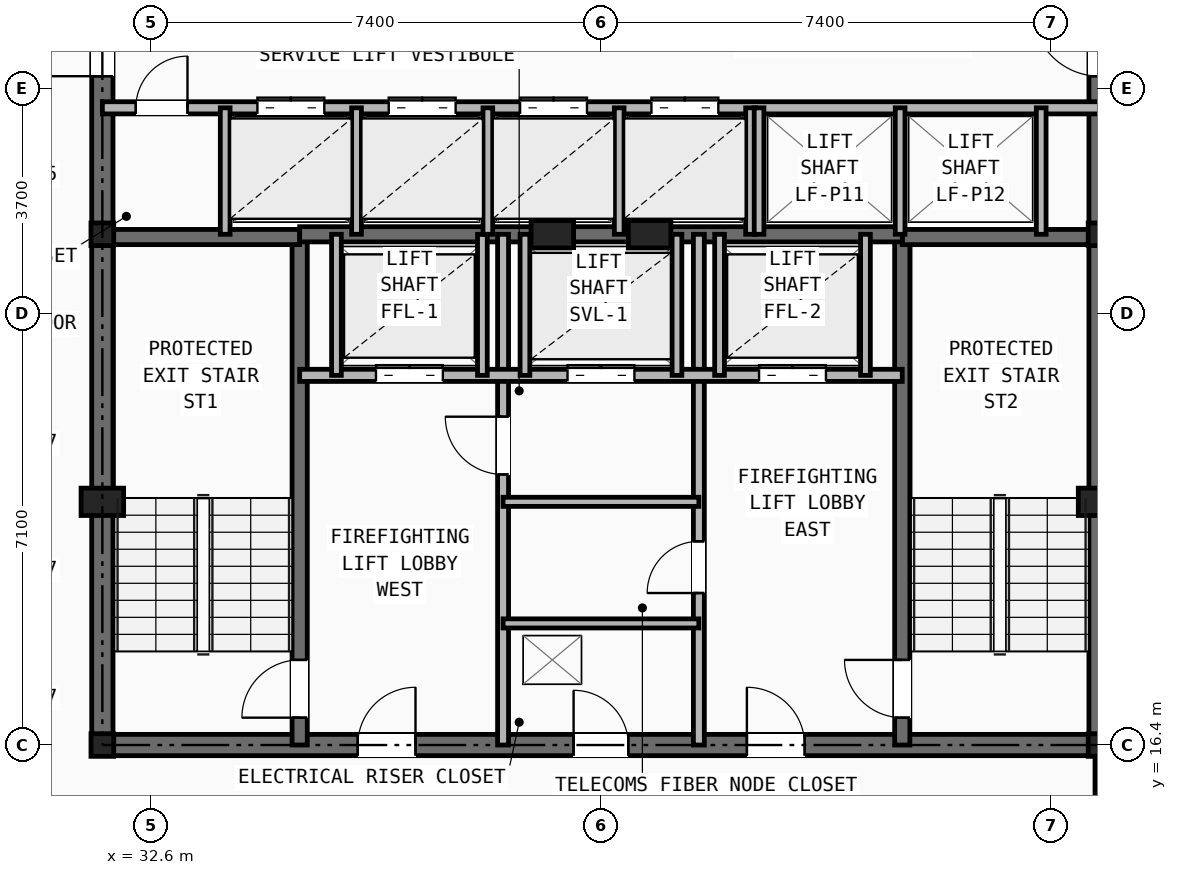
"""IFC4 building model, lengths in metres.
Left out: names, types, materials, properties, quantities, classifications, styles, units other than length and angle.
Written with IfcOpenShell. Run it as: python <this file> out.ifc"""

import sys

from ifc_helpers import new_model, si_unit, direction, frame, frame_2d, origin, origin_2d, place, context, subcontext, project, spatial, rectangle, i_section, extrude, element, fill, save


model = new_model("IFC4")
c1 = context("Model", 3, precision=1e-05, world=origin(), true_north=direction((0.0, 1.0)))
c2 = subcontext(c1, "Body", "Model", "MODEL_VIEW")
j1 = project(units=[si_unit("LENGTHUNIT", "METRE"), si_unit("PLANEANGLEUNIT", "RADIAN")], contexts=[c1])
p1 = place(None, origin())
s1 = spatial("IfcSite", under=j1, at=p1, CompositionType="ELEMENT")
p2 = place(p1, origin())
s2 = spatial("IfcBuilding", under=s1, at=p2, CompositionType="ELEMENT")
p3 = place(p2, frame((0.0, 0.0, 116.0)))
s3 = spatial("IfcBuildingStorey", under=s2, at=p3, CompositionType="ELEMENT", Elevation=116.0)
for number, where, z_axis, x_axis in (
    (1, (31.8, 16.4, 0.0), (0.0, 0.0, 1.0), (1.0, 0.0, 0.0)),
    (2, (48.2, 16.4, 0.0), (0.0, 0.0, 1.0), (1.0, 0.0, 0.0)),
    (3, (31.8, 24.8, 0.0), (0.0, 0.0, 1.0), (1.0, 0.0, 0.0)),
    (4, (48.2, 24.8, 0.0), (0.0, 0.0, 1.0), (1.0, 0.0, 0.0)),
):
    element("IfcColumn", number, at=place(p3, frame(where, z_axis=z_axis, x_axis=x_axis)), inside=s3, PredefinedType="COLUMN", context=c2, shape_type="SweptSolid", body=[
        extrude(i_section(OverallWidth=0.374, OverallDepth=0.372, WebThickness=0.016, FlangeThickness=0.026, at=origin_2d()), origin(), (0.0, 0.0, 1.0), 3.45),
    ])
for number, where, z_axis, x_axis in (
    (5, (31.8, 20.4, 0.0), (0.0, 0.0, 1.0), (1.0, 0.0, 0.0)),
    (6, (48.2, 20.4, 0.0), (0.0, 0.0, 1.0), (1.0, 0.0, 0.0)),
    (7, (39.2, 24.8, 0.0), (0.0, 0.0, 1.0), (1.0, 0.0, 0.0)),
    (8, (40.8, 24.8, 0.0), (0.0, 0.0, 1.0), (1.0, 0.0, 0.0)),
):
    element("IfcColumn", number, at=place(p3, frame(where, z_axis=z_axis, x_axis=x_axis)), inside=s3, PredefinedType="PILASTER", context=c2, shape_type="SweptSolid", body=[
        extrude(rectangle(XDim=0.7, YDim=0.45, at=origin_2d()), origin(), (0.0, 0.0, 1.0), 3.45),
    ])
p4 = place(p3, frame((31.8, 16.4, 0.0), z_axis=(0.0, 0.0, 1.0), x_axis=(1.0, 0.0, 0.0)))
e9 = element("IfcWall", 9, at=p4, inside=s3, PredefinedType="SHEAR", context=c2, shape_type="SweptSolid", body=[
    extrude(rectangle(XDim=16.4, YDim=0.35, at=frame_2d((8.2, 0.0))), origin(), (0.0, 0.0, 1.0), 3.21),
])
p5 = place(p4, frame((7.75, 0.0, 0.0)))
e10 = element("IfcOpeningElement", 10, at=p5, cuts=e9, PredefinedType="OPENING", context=c2, shape_type="SweptSolid", body=[
    extrude(rectangle(XDim=0.9, YDim=2.1, at=frame_2d((0.45, 1.05))), frame((0.0, 0.185, 0.0), z_axis=(0.0, -1.0, 0.0), x_axis=(1.0, 0.0, 0.0)), (0.0, 0.0, 1.0), 0.37),
])
p6 = place(p4, frame((4.2, 0.0, 0.0)))
e11 = element("IfcOpeningElement", 11, at=p6, cuts=e9, PredefinedType="OPENING", context=c2, shape_type="SweptSolid", body=[
    extrude(rectangle(XDim=0.95, YDim=2.1, at=frame_2d((0.475, 1.05))), frame((0.0, 0.185, 0.0), z_axis=(0.0, -1.0, 0.0), x_axis=(1.0, 0.0, 0.0)), (0.0, 0.0, 1.0), 0.37),
])
p7 = place(p4, frame((10.6, 0.0, 0.0)))
e12 = element("IfcOpeningElement", 12, at=p7, cuts=e9, PredefinedType="OPENING", context=c2, shape_type="SweptSolid", body=[
    extrude(rectangle(XDim=0.95, YDim=2.1, at=frame_2d((0.475, 1.05))), frame((0.0, 0.185, 0.0), z_axis=(0.0, -1.0, 0.0), x_axis=(1.0, 0.0, 0.0)), (0.0, 0.0, 1.0), 0.37),
])
p8 = place(p3, frame((31.8, 16.4, 0.0), z_axis=(0.0, 0.0, 1.0), x_axis=(0.0, 1.0, 0.0)))
e13 = element("IfcWall", 13, at=p8, inside=s3, PredefinedType="SHEAR", context=c2, shape_type="SweptSolid", body=[
    extrude(rectangle(XDim=14.8, YDim=0.35, at=frame_2d((7.4, 0.0))), origin(), (0.0, 0.0, 1.0), 3.21),
])
p9 = place(p8, frame((11.0, 0.0, 0.0)))
e14 = element("IfcOpeningElement", 14, at=p9, cuts=e13, PredefinedType="OPENING", context=c2, shape_type="SweptSolid", body=[
    extrude(rectangle(XDim=1.1, YDim=2.15, at=frame_2d((0.55, 1.075))), frame((0.0, 0.185, 0.0), z_axis=(0.0, -1.0, 0.0), x_axis=(1.0, 0.0, 0.0)), (0.0, 0.0, 1.0), 0.37),
])
p10 = place(p3, frame((48.2, 16.4, 0.0), z_axis=(0.0, 0.0, 1.0), x_axis=(0.0, 1.0, 0.0)))
e15 = element("IfcWall", 15, at=p10, inside=s3, PredefinedType="SHEAR", context=c2, shape_type="SweptSolid", body=[
    extrude(rectangle(XDim=14.8, YDim=0.35, at=frame_2d((7.4, 0.0))), origin(), (0.0, 0.0, 1.0), 3.21),
])
p11 = place(p10, frame((11.0, 0.0, 0.0)))
e16 = element("IfcOpeningElement", 16, at=p11, cuts=e15, PredefinedType="OPENING", context=c2, shape_type="SweptSolid", body=[
    extrude(rectangle(XDim=1.1, YDim=2.15, at=frame_2d((0.55, 1.075))), frame((0.0, 0.185, 0.0), z_axis=(0.0, -1.0, 0.0), x_axis=(1.0, 0.0, 0.0)), (0.0, 0.0, 1.0), 0.37),
])
p12 = place(p3, frame((35.045, 16.4, 0.0), z_axis=(0.0, 0.0, 1.0), x_axis=(0.0, 1.0, 0.0)))
e17 = element("IfcWall", 17, at=p12, inside=s3, PredefinedType="SHEAR", context=c2, shape_type="SweptSolid", body=[
    extrude(rectangle(XDim=8.4, YDim=0.25, at=frame_2d((4.2, 0.0))), origin(), (0.0, 0.0, 1.0), 3.21),
])
p13 = place(p12, frame((0.45, 0.0, 0.0)))
e18 = element("IfcOpeningElement", 18, at=p13, cuts=e17, PredefinedType="OPENING", context=c2, shape_type="SweptSolid", body=[
    extrude(rectangle(XDim=0.95, YDim=2.1, at=frame_2d((0.475, 1.05))), frame((0.0, 0.135, 0.0), z_axis=(0.0, -1.0, 0.0), x_axis=(1.0, 0.0, 0.0)), (0.0, 0.0, 1.0), 0.27),
])
p14 = place(p3, frame((31.8, 24.755, 0.0), z_axis=(0.0, 0.0, 1.0), x_axis=(1.0, 0.0, 0.0)))
e19 = element("IfcWall", 19, at=p14, inside=s3, PredefinedType="SHEAR", context=c2, shape_type="SweptSolid", body=[
    extrude(rectangle(XDim=3.245, YDim=0.25, at=frame_2d((1.623, 0.0))), origin(), (0.0, 0.0, 1.0), 3.21),
])
p15 = place(p3, frame((44.955, 16.4, 0.0), z_axis=(0.0, 0.0, 1.0), x_axis=(0.0, 1.0, 0.0)))
e20 = element("IfcWall", 20, at=p15, inside=s3, PredefinedType="SHEAR", context=c2, shape_type="SweptSolid", body=[
    extrude(rectangle(XDim=8.4, YDim=0.25, at=frame_2d((4.2, 0.0))), origin(), (0.0, 0.0, 1.0), 3.21),
])
p16 = place(p15, frame((0.45, 0.0, 0.0)))
e21 = element("IfcOpeningElement", 21, at=p16, cuts=e20, PredefinedType="OPENING", context=c2, shape_type="SweptSolid", body=[
    extrude(rectangle(XDim=0.95, YDim=2.1, at=frame_2d((0.475, 1.05))), frame((0.0, 0.135, 0.0), z_axis=(0.0, -1.0, 0.0), x_axis=(1.0, 0.0, 0.0)), (0.0, 0.0, 1.0), 0.27),
])
p17 = place(p3, frame((44.955, 24.755, 0.0), z_axis=(0.0, 0.0, 1.0), x_axis=(1.0, 0.0, 0.0)))
e22 = element("IfcWall", 22, at=p17, inside=s3, PredefinedType="SHEAR", context=c2, shape_type="SweptSolid", body=[
    extrude(rectangle(XDim=3.245, YDim=0.25, at=frame_2d((1.623, 0.0))), origin(), (0.0, 0.0, 1.0), 3.21),
])
p18 = place(p3, frame((35.045, 24.8, 0.0), z_axis=(0.0, 0.0, 1.0), x_axis=(1.0, 0.0, 0.0)))
e23 = element("IfcWall", 23, at=p18, inside=s3, PredefinedType="SHEAR", context=c2, shape_type="SweptSolid", body=[
    extrude(rectangle(XDim=9.91, YDim=0.25, at=frame_2d((4.955, 0.0))), origin(), (0.0, 0.0, 1.0), 3.21),
])
p19 = place(p3, frame((38.39, 16.4, 0.0), z_axis=(0.0, 0.0, 1.0), x_axis=(0.0, 1.0, 0.0)))
e24 = element("IfcWall", 24, at=p19, inside=s3, PredefinedType="PARTITIONING", context=c2, shape_type="SweptSolid", body=[
    extrude(rectangle(XDim=8.4, YDim=0.18, at=frame_2d((4.2, 0.0))), origin(), (0.0, 0.0, 1.0), 2.661),
])
p20 = place(p19, frame((4.45, 0.0, 0.0)))
e25 = element("IfcOpeningElement", 25, at=p20, cuts=e24, PredefinedType="OPENING", context=c2, shape_type="SweptSolid", body=[
    extrude(rectangle(XDim=0.95, YDim=2.1, at=frame_2d((0.475, 1.05))), frame((0.0, 0.1, 0.0), z_axis=(0.0, -1.0, 0.0), x_axis=(1.0, 0.0, 0.0)), (0.0, 0.0, 1.0), 0.2),
])
p21 = place(p3, frame((41.61, 16.4, 0.0), z_axis=(0.0, 0.0, 1.0), x_axis=(0.0, 1.0, 0.0)))
e26 = element("IfcWall", 26, at=p21, inside=s3, PredefinedType="PARTITIONING", context=c2, shape_type="SweptSolid", body=[
    extrude(rectangle(XDim=8.4, YDim=0.18, at=frame_2d((4.2, 0.0))), origin(), (0.0, 0.0, 1.0), 2.661),
])
p22 = place(p21, frame((2.5, 0.0, 0.0)))
e27 = element("IfcOpeningElement", 27, at=p22, cuts=e26, PredefinedType="OPENING", context=c2, shape_type="SweptSolid", body=[
    extrude(rectangle(XDim=0.85, YDim=2.05, at=frame_2d((0.425, 1.025))), frame((0.0, 0.1, 0.0), z_axis=(0.0, -1.0, 0.0), x_axis=(1.0, 0.0, 0.0)), (0.0, 0.0, 1.0), 0.2),
])
p23 = place(p3, frame((35.045, 22.48, 0.0), z_axis=(0.0, 0.0, 1.0), x_axis=(1.0, 0.0, 0.0)))
e28 = element("IfcWall", 28, at=p23, inside=s3, PredefinedType="SOLIDWALL", context=c2, shape_type="SweptSolid", body=[
    extrude(rectangle(XDim=9.91, YDim=0.2, at=frame_2d((4.955, 0.0))), origin(), (0.0, 0.0, 1.0), 3.21),
])
p24 = place(p23, frame((1.255, 0.0, 0.0)))
e29 = element("IfcOpeningElement", 29, at=p24, cuts=e28, PredefinedType="OPENING", context=c2, shape_type="SweptSolid", body=[
    extrude(rectangle(XDim=1.1, YDim=2.15, at=frame_2d((0.55, 1.075))), frame((0.0, 0.11, 0.0), z_axis=(0.0, -1.0, 0.0), x_axis=(1.0, 0.0, 0.0)), (0.0, 0.0, 1.0), 0.22),
])
p25 = place(p23, frame((7.555, 0.0, 0.0)))
e30 = element("IfcOpeningElement", 30, at=p25, cuts=e28, PredefinedType="OPENING", context=c2, shape_type="SweptSolid", body=[
    extrude(rectangle(XDim=1.1, YDim=2.15, at=frame_2d((0.55, 1.075))), frame((0.0, 0.11, 0.0), z_axis=(0.0, -1.0, 0.0), x_axis=(1.0, 0.0, 0.0)), (0.0, 0.0, 1.0), 0.22),
])
p26 = place(p23, frame((4.405, 0.0, 0.0)))
e31 = element("IfcOpeningElement", 31, at=p26, cuts=e28, PredefinedType="OPENING", context=c2, shape_type="SweptSolid", body=[
    extrude(rectangle(XDim=1.1, YDim=2.15, at=frame_2d((0.55, 1.075))), frame((0.0, 0.11, 0.0), z_axis=(0.0, -1.0, 0.0), x_axis=(1.0, 0.0, 0.0)), (0.0, 0.0, 1.0), 0.22),
])
for number, where, z_axis, x_axis in (
    (32, (38.39, 18.4, 0.0), (0.0, 0.0, 1.0), (1.0, 0.0, 0.0)),
    (33, (38.39, 20.4, 0.0), (0.0, 0.0, 1.0), (1.0, 0.0, 0.0)),
):
    element("IfcWall", number, at=place(p3, frame(where, z_axis=z_axis, x_axis=x_axis)), inside=s3, PredefinedType="PARTITIONING", context=c2, shape_type="SweptSolid", body=[
        extrude(rectangle(XDim=3.22, YDim=0.15, at=frame_2d((1.61, 0.0))), origin(), (0.0, 0.0, 1.0), 3.21),
    ])
for number, where, z_axis, x_axis in (
    (34, (35.65, 22.48, 0.0), (0.0, 0.0, 1.0), (0.0, 1.0, 0.0)),
    (35, (38.05, 22.48, 0.0), (0.0, 0.0, 1.0), (0.0, 1.0, 0.0)),
    (36, (41.95, 22.48, 0.0), (0.0, 0.0, 1.0), (0.0, 1.0, 0.0)),
    (37, (44.35, 22.48, 0.0), (0.0, 0.0, 1.0), (0.0, 1.0, 0.0)),
    (38, (38.75, 22.48, 0.0), (0.0, 0.0, 1.0), (0.0, 1.0, 0.0)),
    (39, (41.25, 22.48, 0.0), (0.0, 0.0, 1.0), (0.0, 1.0, 0.0)),
):
    element("IfcWall", number, at=place(p3, frame(where, z_axis=z_axis, x_axis=x_axis)), inside=s3, PredefinedType="SOLIDWALL", context=c2, shape_type="SweptSolid", body=[
        extrude(rectangle(XDim=2.32, YDim=0.16, at=frame_2d((1.16, 0.0))), origin(), (0.0, 0.0, 1.0), 3.21),
    ])
p27 = place(p3, frame((31.8, 26.88, 0.0), z_axis=(0.0, 0.0, 1.0), x_axis=(1.0, 0.0, 0.0)))
e40 = element("IfcWall", 40, at=p27, inside=s3, PredefinedType="SOLIDWALL", context=c2, shape_type="SweptSolid", body=[
    extrude(rectangle(XDim=16.4, YDim=0.2, at=frame_2d((8.2, 0.0))), origin(), (0.0, 0.0, 1.0), 2.661),
])
p28 = place(p27, frame((0.55, 0.0, 0.0)))
e41 = element("IfcOpeningElement", 41, at=p28, cuts=e40, PredefinedType="OPENING", context=c2, shape_type="SweptSolid", body=[
    extrude(rectangle(XDim=0.85, YDim=2.05, at=frame_2d((0.425, 1.025))), frame((0.0, 0.11, 0.0), z_axis=(0.0, -1.0, 0.0), x_axis=(1.0, 0.0, 0.0)), (0.0, 0.0, 1.0), 0.22),
])
p29 = place(p27, frame((2.55, 0.0, 0.0)))
e42 = element("IfcOpeningElement", 42, at=p29, cuts=e40, PredefinedType="OPENING", context=c2, shape_type="SweptSolid", body=[
    extrude(rectangle(XDim=1.1, YDim=2.15, at=frame_2d((0.55, 1.075))), frame((0.0, 0.11, 0.0), z_axis=(0.0, -1.0, 0.0), x_axis=(1.0, 0.0, 0.0)), (0.0, 0.0, 1.0), 0.22),
])
p30 = place(p27, frame((4.71, 0.0, 0.0)))
e43 = element("IfcOpeningElement", 43, at=p30, cuts=e40, PredefinedType="OPENING", context=c2, shape_type="SweptSolid", body=[
    extrude(rectangle(XDim=1.1, YDim=2.15, at=frame_2d((0.55, 1.075))), frame((0.0, 0.11, 0.0), z_axis=(0.0, -1.0, 0.0), x_axis=(1.0, 0.0, 0.0)), (0.0, 0.0, 1.0), 0.22),
])
p31 = place(p27, frame((6.87, 0.0, 0.0)))
e44 = element("IfcOpeningElement", 44, at=p31, cuts=e40, PredefinedType="OPENING", context=c2, shape_type="SweptSolid", body=[
    extrude(rectangle(XDim=1.1, YDim=2.15, at=frame_2d((0.55, 1.075))), frame((0.0, 0.11, 0.0), z_axis=(0.0, -1.0, 0.0), x_axis=(1.0, 0.0, 0.0)), (0.0, 0.0, 1.0), 0.22),
])
p32 = place(p27, frame((9.03, 0.0, 0.0)))
e45 = element("IfcOpeningElement", 45, at=p32, cuts=e40, PredefinedType="OPENING", context=c2, shape_type="SweptSolid", body=[
    extrude(rectangle(XDim=1.1, YDim=2.15, at=frame_2d((0.55, 1.075))), frame((0.0, 0.11, 0.0), z_axis=(0.0, -1.0, 0.0), x_axis=(1.0, 0.0, 0.0)), (0.0, 0.0, 1.0), 0.22),
])
for number, where, z_axis, x_axis in (
    (46, (33.82, 24.8, 0.0), (0.0, 0.0, 1.0), (0.0, 1.0, 0.0)),
    (47, (35.98, 24.8, 0.0), (0.0, 0.0, 1.0), (0.0, 1.0, 0.0)),
    (48, (38.14, 24.8, 0.0), (0.0, 0.0, 1.0), (0.0, 1.0, 0.0)),
    (49, (40.3, 24.8, 0.0), (0.0, 0.0, 1.0), (0.0, 1.0, 0.0)),
    (50, (42.46, 24.8, 0.0), (0.0, 0.0, 1.0), (0.0, 1.0, 0.0)),
    (51, (42.6, 24.8, 0.0), (0.0, 0.0, 1.0), (0.0, 1.0, 0.0)),
    (52, (44.92, 24.8, 0.0), (0.0, 0.0, 1.0), (0.0, 1.0, 0.0)),
    (53, (47.24, 24.8, 0.0), (0.0, 0.0, 1.0), (0.0, 1.0, 0.0)),
):
    element("IfcWall", number, at=place(p3, frame(where, z_axis=z_axis, x_axis=x_axis)), inside=s3, PredefinedType="SOLIDWALL", context=c2, shape_type="SweptSolid", body=[
        extrude(rectangle(XDim=2.08, YDim=0.16, at=frame_2d((1.04, 0.0))), origin(), (0.0, 0.0, 1.0), 3.21),
    ])
p33 = place(p3, frame((48.2, 14.1, 0.0), z_axis=(0.0, 0.0, 1.0), x_axis=(0.0, 1.0, 0.0)))
e54 = element("IfcWall", 54, at=p33, inside=s3, PredefinedType="PARTITIONING", context=c2, shape_type="SweptSolid", body=[
    extrude(rectangle(XDim=2.3, YDim=0.15, at=frame_2d((1.15, 0.0))), origin(), (0.0, 0.0, 1.0), 2.661),
])
p34 = place(p5, origin())
e55 = element("IfcDoor", 55, at=p34, inside=s3, OperationType="SINGLE_SWING_LEFT", PredefinedType="DOOR", context=c2, shape_type="SweptSolid", body=[
    extrude(rectangle(XDim=0.9, YDim=2.1, at=frame_2d((0.45, 1.05))), frame((0.0, 0.025, 0.0), z_axis=(0.0, -1.0, 0.0), x_axis=(1.0, 0.0, 0.0)), (0.0, 0.0, 1.0), 0.05),
])
fill(e10, e55)
p35 = place(p22, origin())
e56 = element("IfcDoor", 56, at=p35, inside=s3, OperationType="SINGLE_SWING_LEFT", PredefinedType="DOOR", context=c2, shape_type="SweptSolid", body=[
    extrude(rectangle(XDim=0.85, YDim=2.05, at=frame_2d((0.425, 1.025))), frame((0.0, 0.025, 0.0), z_axis=(0.0, -1.0, 0.0), x_axis=(1.0, 0.0, 0.0)), (0.0, 0.0, 1.0), 0.05),
])
fill(e27, e56)
p36 = place(p20, origin())
e57 = element("IfcDoor", 57, at=p36, inside=s3, OperationType="SINGLE_SWING_RIGHT", PredefinedType="DOOR", context=c2, shape_type="SweptSolid", body=[
    extrude(rectangle(XDim=0.95, YDim=2.1, at=frame_2d((0.475, 1.05))), frame((0.0, 0.025, 0.0), z_axis=(0.0, -1.0, 0.0), x_axis=(1.0, 0.0, 0.0)), (0.0, 0.0, 1.0), 0.05),
])
fill(e25, e57)
p37 = place(p13, origin())
e58 = element("IfcDoor", 58, at=p37, inside=s3, OperationType="SINGLE_SWING_LEFT", PredefinedType="DOOR", context=c2, shape_type="SweptSolid", body=[
    extrude(rectangle(XDim=0.95, YDim=2.1, at=frame_2d((0.475, 1.05))), frame((0.0, 0.025, 0.0), z_axis=(0.0, -1.0, 0.0), x_axis=(1.0, 0.0, 0.0)), (0.0, 0.0, 1.0), 0.05),
])
fill(e18, e58)
p38 = place(p16, origin())
e59 = element("IfcDoor", 59, at=p38, inside=s3, OperationType="SINGLE_SWING_RIGHT", PredefinedType="DOOR", context=c2, shape_type="SweptSolid", body=[
    extrude(rectangle(XDim=0.95, YDim=2.1, at=frame_2d((0.475, 1.05))), frame((0.0, 0.025, 0.0), z_axis=(0.0, -1.0, 0.0), x_axis=(1.0, 0.0, 0.0)), (0.0, 0.0, 1.0), 0.05),
])
fill(e21, e59)
p39 = place(p6, origin())
e60 = element("IfcDoor", 60, at=p39, inside=s3, OperationType="SINGLE_SWING_RIGHT", PredefinedType="DOOR", context=c2, shape_type="SweptSolid", body=[
    extrude(rectangle(XDim=0.95, YDim=2.1, at=frame_2d((0.475, 1.05))), frame((0.0, 0.025, 0.0), z_axis=(0.0, -1.0, 0.0), x_axis=(1.0, 0.0, 0.0)), (0.0, 0.0, 1.0), 0.05),
])
fill(e11, e60)
p40 = place(p7, origin())
e61 = element("IfcDoor", 61, at=p40, inside=s3, OperationType="SINGLE_SWING_LEFT", PredefinedType="DOOR", context=c2, shape_type="SweptSolid", body=[
    extrude(rectangle(XDim=0.95, YDim=2.1, at=frame_2d((0.475, 1.05))), frame((0.0, 0.025, 0.0), z_axis=(0.0, -1.0, 0.0), x_axis=(1.0, 0.0, 0.0)), (0.0, 0.0, 1.0), 0.05),
])
fill(e12, e61)
p41 = place(p24, origin())
e62 = element("IfcDoor", 62, at=p41, inside=s3, OperationType="DOUBLE_DOOR_SLIDING", PredefinedType="DOOR", context=c2, shape_type="SweptSolid", body=[
    extrude(rectangle(XDim=1.1, YDim=2.15, at=frame_2d((0.55, 1.075))), frame((0.0, 0.025, 0.0), z_axis=(0.0, -1.0, 0.0), x_axis=(1.0, 0.0, 0.0)), (0.0, 0.0, 1.0), 0.05),
])
fill(e29, e62)
p42 = place(p25, origin())
e63 = element("IfcDoor", 63, at=p42, inside=s3, OperationType="DOUBLE_DOOR_SLIDING", PredefinedType="DOOR", context=c2, shape_type="SweptSolid", body=[
    extrude(rectangle(XDim=1.1, YDim=2.15, at=frame_2d((0.55, 1.075))), frame((0.0, 0.025, 0.0), z_axis=(0.0, -1.0, 0.0), x_axis=(1.0, 0.0, 0.0)), (0.0, 0.0, 1.0), 0.05),
])
fill(e30, e63)
p43 = place(p26, origin())
e64 = element("IfcDoor", 64, at=p43, inside=s3, OperationType="DOUBLE_DOOR_SLIDING", PredefinedType="DOOR", context=c2, shape_type="SweptSolid", body=[
    extrude(rectangle(XDim=1.1, YDim=2.15, at=frame_2d((0.55, 1.075))), frame((0.0, 0.025, 0.0), z_axis=(0.0, -1.0, 0.0), x_axis=(1.0, 0.0, 0.0)), (0.0, 0.0, 1.0), 0.05),
])
fill(e31, e64)
p44 = place(p28, origin())
e65 = element("IfcDoor", 65, at=p44, inside=s3, OperationType="SINGLE_SWING_RIGHT", PredefinedType="DOOR", context=c2, shape_type="SweptSolid", body=[
    extrude(rectangle(XDim=0.85, YDim=2.05, at=frame_2d((0.425, 1.025))), frame((0.0, 0.025, 0.0), z_axis=(0.0, -1.0, 0.0), x_axis=(1.0, 0.0, 0.0)), (0.0, 0.0, 1.0), 0.05),
])
fill(e41, e65)
p45 = place(p9, origin())
e66 = element("IfcDoor", 66, at=p45, inside=s3, OperationType="SINGLE_SWING_LEFT", PredefinedType="DOOR", context=c2, shape_type="SweptSolid", body=[
    extrude(rectangle(XDim=1.1, YDim=2.15, at=frame_2d((0.55, 1.075))), frame((0.0, 0.025, 0.0), z_axis=(0.0, -1.0, 0.0), x_axis=(1.0, 0.0, 0.0)), (0.0, 0.0, 1.0), 0.05),
])
fill(e14, e66)
p46 = place(p29, origin())
e67 = element("IfcDoor", 67, at=p46, inside=s3, OperationType="DOUBLE_DOOR_SLIDING", PredefinedType="DOOR", context=c2, shape_type="SweptSolid", body=[
    extrude(rectangle(XDim=1.1, YDim=2.15, at=frame_2d((0.55, 1.075))), frame((0.0, 0.025, 0.0), z_axis=(0.0, -1.0, 0.0), x_axis=(1.0, 0.0, 0.0)), (0.0, 0.0, 1.0), 0.05),
])
fill(e42, e67)
p47 = place(p30, origin())
e68 = element("IfcDoor", 68, at=p47, inside=s3, OperationType="DOUBLE_DOOR_SLIDING", PredefinedType="DOOR", context=c2, shape_type="SweptSolid", body=[
    extrude(rectangle(XDim=1.1, YDim=2.15, at=frame_2d((0.55, 1.075))), frame((0.0, 0.025, 0.0), z_axis=(0.0, -1.0, 0.0), x_axis=(1.0, 0.0, 0.0)), (0.0, 0.0, 1.0), 0.05),
])
fill(e43, e68)
p48 = place(p31, origin())
e69 = element("IfcDoor", 69, at=p48, inside=s3, OperationType="DOUBLE_DOOR_SLIDING", PredefinedType="DOOR", context=c2, shape_type="SweptSolid", body=[
    extrude(rectangle(XDim=1.1, YDim=2.15, at=frame_2d((0.55, 1.075))), frame((0.0, 0.025, 0.0), z_axis=(0.0, -1.0, 0.0), x_axis=(1.0, 0.0, 0.0)), (0.0, 0.0, 1.0), 0.05),
])
fill(e44, e69)
p49 = place(p32, origin())
e70 = element("IfcDoor", 70, at=p49, inside=s3, OperationType="DOUBLE_DOOR_SLIDING", PredefinedType="DOOR", context=c2, shape_type="SweptSolid", body=[
    extrude(rectangle(XDim=1.1, YDim=2.15, at=frame_2d((0.55, 1.075))), frame((0.0, 0.025, 0.0), z_axis=(0.0, -1.0, 0.0), x_axis=(1.0, 0.0, 0.0)), (0.0, 0.0, 1.0), 0.05),
])
fill(e45, e70)
save(model, sys.argv[1])
